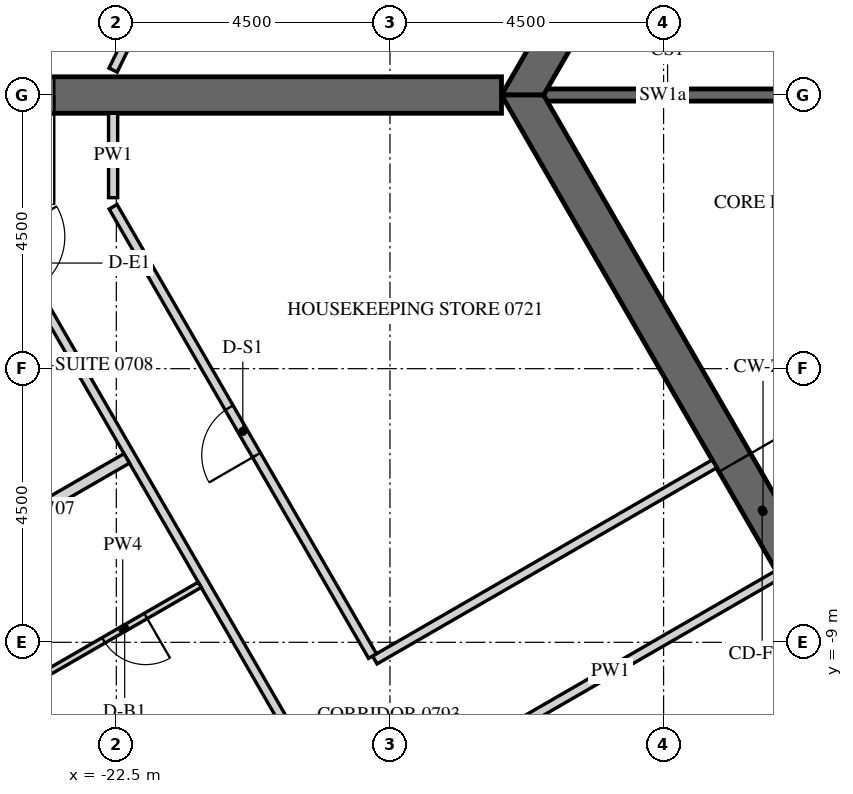
"""IFC4 building model, lengths in metres.
Left out: names, types, materials, properties, quantities, classifications, styles, units other than length and angle.
Written with IfcOpenShell. Run it as: python <this file> out.ifc"""

import sys

from ifc_helpers import new_model, si_unit, direction, frame, frame_2d, origin, place, context, subcontext, project, spatial, polyline, rectangle, outline, extrude, element, fill, save


model = new_model("IFC4")
c1 = context("Model", 3, precision=1e-05, world=origin(), true_north=direction((0.0, 1.0)))
c2 = subcontext(c1, "Body", "Model", "MODEL_VIEW")
j1 = project(units=[si_unit("LENGTHUNIT", "METRE"), si_unit("PLANEANGLEUNIT", "RADIAN")], contexts=[c1])
p1 = place(None, origin())
s1 = spatial("IfcSite", under=j1, at=p1, CompositionType="ELEMENT")
p2 = place(p1, origin())
s2 = spatial("IfcBuilding", under=s1, at=p2, CompositionType="ELEMENT")
p3 = place(p2, frame((0.0, 0.0, 99.9)))
s3 = spatial("IfcBuildingStorey", under=s2, at=p3, CompositionType="ELEMENT", Elevation=99.9)
p4 = place(p3, frame((-19.595, 27.633, -0.15), z_axis=(0.0, 0.0, 1.0), x_axis=(-0.438368285794, -0.898795441694, 0.0)))
e1 = element("IfcWall", 1, at=p4, inside=s3, PredefinedType="SOLIDWALL", context=c2, shape_type="SweptSolid", body=[
    extrude(outline(polyline([(-0.026, -0.275), (30.093, -0.275), (30.048, 0.275), (0.026, 0.275), (-0.026, -0.275)])), origin(), (0.0, 0.0, 1.0), 3.9),
])
p5 = place(p4, frame((1.236, 0.0, 1.05)))
e2 = element("IfcOpeningElement", 2, at=p5, cuts=e1, PredefinedType="OPENING", context=c2, shape_type="SweptSolid", body=[
    extrude(rectangle(XDim=2.4, YDim=2.4, at=frame_2d((1.2, 1.2))), frame((0.0, 0.285, 0.0), z_axis=(0.0, -1.0, 0.0), x_axis=(1.0, 0.0, 0.0)), (0.0, 0.0, 1.0), 0.57),
])
p6 = place(p4, frame((4.835, 0.0, 1.05)))
e3 = element("IfcOpeningElement", 3, at=p6, cuts=e1, PredefinedType="OPENING", context=c2, shape_type="SweptSolid", body=[
    extrude(rectangle(XDim=2.4, YDim=2.4, at=frame_2d((1.2, 1.2))), frame((0.0, 0.285, 0.0), z_axis=(0.0, -1.0, 0.0), x_axis=(1.0, 0.0, 0.0)), (0.0, 0.0, 1.0), 0.57),
])
p7 = place(p4, frame((8.436, 0.0, 1.05)))
e4 = element("IfcOpeningElement", 4, at=p7, cuts=e1, PredefinedType="OPENING", context=c2, shape_type="SweptSolid", body=[
    extrude(rectangle(XDim=2.4, YDim=2.4, at=frame_2d((1.2, 1.2))), frame((0.0, 0.285, 0.0), z_axis=(0.0, -1.0, 0.0), x_axis=(1.0, 0.0, 0.0)), (0.0, 0.0, 1.0), 0.57),
])
p8 = place(p4, frame((12.035, 0.0, 1.05)))
e5 = element("IfcOpeningElement", 5, at=p8, cuts=e1, PredefinedType="OPENING", context=c2, shape_type="SweptSolid", body=[
    extrude(rectangle(XDim=2.4, YDim=2.4, at=frame_2d((1.2, 1.2))), frame((0.0, 0.285, 0.0), z_axis=(0.0, -1.0, 0.0), x_axis=(1.0, 0.0, 0.0)), (0.0, 0.0, 1.0), 0.57),
])
p9 = place(p4, frame((15.635, 0.0, 1.05)))
e6 = element("IfcOpeningElement", 6, at=p9, cuts=e1, PredefinedType="OPENING", context=c2, shape_type="SweptSolid", body=[
    extrude(rectangle(XDim=2.4, YDim=2.4, at=frame_2d((1.2, 1.2))), frame((0.0, 0.285, 0.0), z_axis=(0.0, -1.0, 0.0), x_axis=(1.0, 0.0, 0.0)), (0.0, 0.0, 1.0), 0.57),
])
p10 = place(p4, frame((19.236, 0.0, 1.05)))
e7 = element("IfcOpeningElement", 7, at=p10, cuts=e1, PredefinedType="OPENING", context=c2, shape_type="SweptSolid", body=[
    extrude(rectangle(XDim=2.4, YDim=2.4, at=frame_2d((1.2, 1.2))), frame((0.0, 0.285, 0.0), z_axis=(0.0, -1.0, 0.0), x_axis=(1.0, 0.0, 0.0)), (0.0, 0.0, 1.0), 0.57),
])
p11 = place(p4, frame((22.835, 0.0, 1.05)))
e8 = element("IfcOpeningElement", 8, at=p11, cuts=e1, PredefinedType="OPENING", context=c2, shape_type="SweptSolid", body=[
    extrude(rectangle(XDim=2.4, YDim=2.4, at=frame_2d((1.2, 1.2))), frame((0.0, 0.285, 0.0), z_axis=(0.0, -1.0, 0.0), x_axis=(1.0, 0.0, 0.0)), (0.0, 0.0, 1.0), 0.57),
])
p12 = place(p4, frame((26.436, 0.0, 1.05)))
e9 = element("IfcOpeningElement", 9, at=p12, cuts=e1, PredefinedType="OPENING", context=c2, shape_type="SweptSolid", body=[
    extrude(rectangle(XDim=2.4, YDim=2.4, at=frame_2d((1.2, 1.2))), frame((0.0, 0.285, 0.0), z_axis=(0.0, -1.0, 0.0), x_axis=(1.0, 0.0, 0.0)), (0.0, 0.0, 1.0), 0.57),
])
p13 = place(p3, frame((-32.655, -2.89, -0.15), z_axis=(0.0, 0.0, 1.0), x_axis=(0.499997711317, -0.866026725152, 0.0)))
e10 = element("IfcWall", 10, at=p13, inside=s3, PredefinedType="SOLIDWALL", context=c2, shape_type="SweptSolid", body=[
    extrude(outline(polyline([(-0.022, -0.275), (30.097, -0.275), (30.045, 0.275), (0.022, 0.275), (-0.022, -0.275)])), origin(), (0.0, 0.0, 1.0), 3.9),
])
p14 = place(p13, frame((1.236, 0.0, 1.05)))
e11 = element("IfcOpeningElement", 11, at=p14, cuts=e10, PredefinedType="OPENING", context=c2, shape_type="SweptSolid", body=[
    extrude(rectangle(XDim=2.4, YDim=2.4, at=frame_2d((1.2, 1.2))), frame((0.0, 0.285, 0.0), z_axis=(0.0, -1.0, 0.0), x_axis=(1.0, 0.0, 0.0)), (0.0, 0.0, 1.0), 0.57),
])
p15 = place(p13, frame((4.835, 0.0, 1.05)))
e12 = element("IfcOpeningElement", 12, at=p15, cuts=e10, PredefinedType="OPENING", context=c2, shape_type="SweptSolid", body=[
    extrude(rectangle(XDim=2.4, YDim=2.4, at=frame_2d((1.2, 1.2))), frame((0.0, 0.285, 0.0), z_axis=(0.0, -1.0, 0.0), x_axis=(1.0, 0.0, 0.0)), (0.0, 0.0, 1.0), 0.57),
])
p16 = place(p13, frame((8.436, 0.0, 1.05)))
e13 = element("IfcOpeningElement", 13, at=p16, cuts=e10, PredefinedType="OPENING", context=c2, shape_type="SweptSolid", body=[
    extrude(rectangle(XDim=2.4, YDim=2.4, at=frame_2d((1.2, 1.2))), frame((0.0, 0.285, 0.0), z_axis=(0.0, -1.0, 0.0), x_axis=(1.0, 0.0, 0.0)), (0.0, 0.0, 1.0), 0.57),
])
p17 = place(p13, frame((12.035, 0.0, 1.05)))
e14 = element("IfcOpeningElement", 14, at=p17, cuts=e10, PredefinedType="OPENING", context=c2, shape_type="SweptSolid", body=[
    extrude(rectangle(XDim=2.4, YDim=2.4, at=frame_2d((1.2, 1.2))), frame((0.0, 0.285, 0.0), z_axis=(0.0, -1.0, 0.0), x_axis=(1.0, 0.0, 0.0)), (0.0, 0.0, 1.0), 0.57),
])
p18 = place(p13, frame((15.635, 0.0, 1.05)))
e15 = element("IfcOpeningElement", 15, at=p18, cuts=e10, PredefinedType="OPENING", context=c2, shape_type="SweptSolid", body=[
    extrude(rectangle(XDim=2.4, YDim=2.4, at=frame_2d((1.2, 1.2))), frame((0.0, 0.285, 0.0), z_axis=(0.0, -1.0, 0.0), x_axis=(1.0, 0.0, 0.0)), (0.0, 0.0, 1.0), 0.57),
])
p19 = place(p13, frame((19.236, 0.0, 1.05)))
e16 = element("IfcOpeningElement", 16, at=p19, cuts=e10, PredefinedType="OPENING", context=c2, shape_type="SweptSolid", body=[
    extrude(rectangle(XDim=2.4, YDim=2.4, at=frame_2d((1.2, 1.2))), frame((0.0, 0.285, 0.0), z_axis=(0.0, -1.0, 0.0), x_axis=(1.0, 0.0, 0.0)), (0.0, 0.0, 1.0), 0.57),
])
p20 = place(p13, frame((22.835, 0.0, 1.05)))
e17 = element("IfcOpeningElement", 17, at=p20, cuts=e10, PredefinedType="OPENING", context=c2, shape_type="SweptSolid", body=[
    extrude(rectangle(XDim=2.4, YDim=2.4, at=frame_2d((1.2, 1.2))), frame((0.0, 0.285, 0.0), z_axis=(0.0, -1.0, 0.0), x_axis=(1.0, 0.0, 0.0)), (0.0, 0.0, 1.0), 0.57),
])
p21 = place(p13, frame((26.436, 0.0, 1.05)))
e18 = element("IfcOpeningElement", 18, at=p21, cuts=e10, PredefinedType="OPENING", context=c2, shape_type="SweptSolid", body=[
    extrude(rectangle(XDim=2.4, YDim=2.4, at=frame_2d((1.2, 1.2))), frame((0.0, 0.285, 0.0), z_axis=(0.0, -1.0, 0.0), x_axis=(1.0, 0.0, 0.0)), (0.0, 0.0, 1.0), 0.57),
])
p22 = place(p3, frame((-7.91, 13.7, -0.15), z_axis=(0.0, 0.0, 1.0), x_axis=(-0.499999880136, -0.866025472988, 0.0)))
e19 = element("IfcWall", 19, at=p22, inside=s3, PredefinedType="SHEAR", context=c2, shape_type="SweptSolid", body=[
    extrude(outline(polyline([(-0.173, -0.3), (15.993, -0.3), (15.646, 0.3), (0.173, 0.3), (-0.173, -0.3)])), origin(), (0.0, 0.0, 1.0), 3.9),
])
p23 = place(p22, frame((7.039, 0.0, 0.15)))
e20 = element("IfcOpeningElement", 20, at=p23, cuts=e19, PredefinedType="OPENING", context=c2, shape_type="SweptSolid", body=[
    extrude(rectangle(XDim=1.8, YDim=2.4, at=frame_2d((0.9, 1.2))), frame((0.0, 0.31, 0.0), z_axis=(0.0, -1.0, 0.0), x_axis=(1.0, 0.0, 0.0)), (0.0, 0.0, 1.0), 0.62),
])
p24 = place(p3, frame((-15.819, 0.0, -0.15), z_axis=(0.0, 0.0, 1.0), x_axis=(0.499999880136, -0.866025472988, 0.0)))
e21 = element("IfcWall", 21, at=p24, inside=s3, PredefinedType="SHEAR", context=c2, shape_type="SweptSolid", body=[
    extrude(outline(polyline([(-0.173, -0.3), (15.993, -0.3), (15.646, 0.3), (0.173, 0.3), (-0.173, -0.3)])), origin(), (0.0, 0.0, 1.0), 3.9),
])
p25 = place(p24, frame((6.981, 0.0, 0.15)))
e22 = element("IfcOpeningElement", 22, at=p25, cuts=e21, PredefinedType="OPENING", context=c2, shape_type="SweptSolid", body=[
    extrude(rectangle(XDim=1.8, YDim=2.4, at=frame_2d((0.9, 1.2))), frame((0.0, 0.31, 0.0), z_axis=(0.0, -1.0, 0.0), x_axis=(1.0, 0.0, 0.0)), (0.0, 0.0, 1.0), 0.62),
])
p26 = place(p3, frame((-16.166, 0.0, -0.15), z_axis=(0.0, 0.0, 1.0), x_axis=(-1.0, 0.0, 0.0)))
e23 = element("IfcWall", 23, at=p26, inside=s3, PredefinedType="SHEAR", context=c2, shape_type="SweptSolid", body=[
    extrude(rectangle(XDim=16.509, YDim=0.6, at=frame_2d((8.254, 0.0))), origin(), (0.0, 0.0, 1.0), 3.9),
])
p27 = place(p26, frame((7.354, 0.0, 0.15)))
e24 = element("IfcOpeningElement", 24, at=p27, cuts=e23, PredefinedType="OPENING", context=c2, shape_type="SweptSolid", body=[
    extrude(rectangle(XDim=1.8, YDim=2.4, at=frame_2d((0.9, 1.2))), frame((0.0, 0.31, 0.0), z_axis=(0.0, -1.0, 0.0), x_axis=(1.0, 0.0, 0.0)), (0.0, 0.0, 1.0), 0.62),
])
p28 = place(p3, frame((-11.547, 0.0, -0.15), z_axis=(0.0, 0.0, 1.0), x_axis=(-1.0, 0.0, 0.0)))
e25 = element("IfcWall", 25, at=p28, inside=s3, PredefinedType="SHEAR", context=c2, shape_type="SweptSolid", body=[
    extrude(rectangle(XDim=3.926, YDim=0.2, at=frame_2d((1.963, 0.0))), origin(), (0.0, 0.0, 1.0), 3.9),
])
p29 = place(p3, frame((-22.553, 0.41, 0.0), z_axis=(0.0, 0.0, 1.0), x_axis=(0.438382679221, 0.898788421465, 0.0)))
e26 = element("IfcWall", 26, at=p29, inside=s3, PredefinedType="PARTITIONING", context=c2, shape_type="SweptSolid", body=[
    extrude(rectangle(XDim=9.866, YDim=0.15, at=frame_2d((4.933, 0.0))), origin(), (0.0, 0.0, 1.0), 2.988),
])
p30 = place(p29, frame((4.483, 0.0, 0.0)))
e27 = element("IfcOpeningElement", 27, at=p30, cuts=e26, PredefinedType="OPENING", context=c2, shape_type="SweptSolid", body=[
    extrude(rectangle(XDim=0.9, YDim=2.1, at=frame_2d((0.45, 1.05))), frame((0.0, 0.085, 0.0), z_axis=(0.0, -1.0, 0.0), x_axis=(1.0, 0.0, 0.0)), (0.0, 0.0, 1.0), 0.17),
])
p31 = place(p3, frame((-24.436, -2.175, 0.0), z_axis=(0.0, 0.0, 1.0), x_axis=(0.499996816197, -0.866027241946, 0.0)))
e28 = element("IfcWall", 28, at=p31, inside=s3, PredefinedType="PARTITIONING", context=c2, shape_type="SweptSolid", body=[
    extrude(rectangle(XDim=24.238, YDim=0.15, at=frame_2d((12.119, 0.0))), origin(), (0.0, 0.0, 1.0), 2.988),
])
p32 = place(p31, frame((0.179, 0.0, 0.0)))
e29 = element("IfcOpeningElement", 29, at=p32, cuts=e28, PredefinedType="OPENING", context=c2, shape_type="SweptSolid", body=[
    extrude(rectangle(XDim=1.0, YDim=2.1, at=frame_2d((0.5, 1.05))), frame((0.0, 0.085, 0.0), z_axis=(0.0, -1.0, 0.0), x_axis=(1.0, 0.0, 0.0)), (0.0, 0.0, 1.0), 0.17),
])
p33 = place(p31, frame((12.246, 0.0, 0.0)))
e30 = element("IfcOpeningElement", 30, at=p33, cuts=e28, PredefinedType="OPENING", context=c2, shape_type="SweptSolid", body=[
    extrude(rectangle(XDim=1.0, YDim=2.1, at=frame_2d((0.5, 1.05))), frame((0.0, 0.085, 0.0), z_axis=(0.0, -1.0, 0.0), x_axis=(1.0, 0.0, 0.0)), (0.0, 0.0, 1.0), 0.17),
])
p34 = place(p31, frame((19.792, 0.0, 0.0)))
e31 = element("IfcOpeningElement", 31, at=p34, cuts=e28, PredefinedType="OPENING", context=c2, shape_type="SweptSolid", body=[
    extrude(rectangle(XDim=1.0, YDim=2.1, at=frame_2d((0.5, 1.05))), frame((0.0, 0.085, 0.0), z_axis=(0.0, -1.0, 0.0), x_axis=(1.0, 0.0, 0.0)), (0.0, 0.0, 1.0), 0.17),
])
p35 = place(p3, frame((-12.664, -6.066, 0.0), z_axis=(0.0, 0.0, 1.0), x_axis=(-0.866021702275, -0.500006411147, 0.0)))
e32 = element("IfcWall", 32, at=p35, inside=s3, PredefinedType="PARTITIONING", context=c2, shape_type="SweptSolid", body=[
    extrude(rectangle(XDim=6.45, YDim=0.15, at=frame_2d((3.225, 0.0))), origin(), (0.0, 0.0, 1.0), 2.988),
])
p36 = place(p3, frame((-18.287, -9.226, 0.0), z_axis=(0.0, 0.0, 1.0), x_axis=(-0.500004853958, 0.866022601332, 0.0)))
e33 = element("IfcWall", 33, at=p36, inside=s3, PredefinedType="PARTITIONING", context=c2, shape_type="SweptSolid", body=[
    extrude(rectangle(XDim=8.531, YDim=0.15, at=frame_2d((4.266, 0.0))), origin(), (0.0, 0.0, 1.0), 2.988),
])
p37 = place(p36, frame((3.816, 0.0, 0.0)))
e34 = element("IfcOpeningElement", 34, at=p37, cuts=e33, PredefinedType="OPENING", context=c2, shape_type="SweptSolid", body=[
    extrude(rectangle(XDim=0.9, YDim=2.1, at=frame_2d((0.45, 1.05))), frame((0.0, 0.085, 0.0), z_axis=(0.0, -1.0, 0.0), x_axis=(1.0, 0.0, 0.0)), (0.0, 0.0, 1.0), 0.17),
])
p38 = place(p3, frame((-22.553, -1.688, 0.0), z_axis=(0.0, 0.0, 1.0), x_axis=(0.0, 1.0, 0.0)))
e35 = element("IfcWall", 35, at=p38, inside=s3, PredefinedType="PARTITIONING", context=c2, shape_type="SweptSolid", body=[
    extrude(rectangle(XDim=1.387, YDim=0.15, at=frame_2d((0.694, 0.0))), origin(), (0.0, 0.0, 1.0), 2.988),
])
p39 = place(p3, frame((-17.135, -11.072, 0.0), z_axis=(0.0, 0.0, 1.0), x_axis=(0.866028703517, 0.499994284652, 0.0)))
e36 = element("IfcWall", 36, at=p39, inside=s3, PredefinedType="PARTITIONING", context=c2, shape_type="SweptSolid", body=[
    extrude(rectangle(XDim=6.375, YDim=0.15, at=frame_2d((3.188, 0.0))), origin(), (0.0, 0.0, 1.0), 2.988),
])
p40 = place(p3, frame((-28.499, -9.538, 0.0), z_axis=(0.0, 0.0, 1.0), x_axis=(0.866024672353, 0.500001266874, 0.0)))
e37 = element("IfcWall", 37, at=p40, inside=s3, PredefinedType="PARTITIONING", context=c2, shape_type="SweptSolid", body=[
    extrude(rectangle(XDim=7.125, YDim=0.18, at=frame_2d((3.562, 0.0))), origin(), (0.0, 0.0, 1.0), 2.988),
])
p41 = place(p3, frame((-21.128, -8.054, 0.0), z_axis=(0.0, 0.0, 1.0), x_axis=(-0.866046596414, -0.499963291492, 0.0)))
e38 = element("IfcWall", 38, at=p41, inside=s3, PredefinedType="PARTITIONING", context=c2, shape_type="SweptSolid", body=[
    extrude(rectangle(XDim=2.925, YDim=0.1, at=frame_2d((1.462, 0.0))), origin(), (0.0, 0.0, 1.0), 2.988),
])
p42 = place(p41, frame((1.025, 0.0, 0.0)))
e39 = element("IfcOpeningElement", 39, at=p42, cuts=e38, PredefinedType="OPENING", context=c2, shape_type="SweptSolid", body=[
    extrude(rectangle(XDim=0.8, YDim=2.1, at=frame_2d((0.4, 1.05))), frame((0.0, 0.06, 0.0), z_axis=(0.0, -1.0, 0.0), x_axis=(1.0, 0.0, 0.0)), (0.0, 0.0, 1.0), 0.12),
])
p43 = place(p25, origin())
e40 = element("IfcDoor", 40, at=p43, inside=s3, OperationType="DOUBLE_DOOR_SINGLE_SWING", PredefinedType="DOOR", context=c2, shape_type="SweptSolid", body=[
    extrude(rectangle(XDim=1.8, YDim=2.4, at=frame_2d((0.9, 1.2))), frame((0.0, 0.025, 0.0), z_axis=(0.0, -1.0, 0.0), x_axis=(1.0, 0.0, 0.0)), (0.0, 0.0, 1.0), 0.05),
])
fill(e22, e40)
p44 = place(p27, origin())
e41 = element("IfcDoor", 41, at=p44, inside=s3, OperationType="DOUBLE_DOOR_SINGLE_SWING", PredefinedType="DOOR", context=c2, shape_type="SweptSolid", body=[
    extrude(rectangle(XDim=1.8, YDim=2.4, at=frame_2d((0.9, 1.2))), frame((0.0, 0.025, 0.0), z_axis=(0.0, -1.0, 0.0), x_axis=(1.0, 0.0, 0.0)), (0.0, 0.0, 1.0), 0.05),
])
fill(e24, e41)
p45 = place(p42, origin())
e42 = element("IfcDoor", 42, at=p45, inside=s3, OperationType="SINGLE_SWING_RIGHT", PredefinedType="DOOR", context=c2, shape_type="SweptSolid", body=[
    extrude(rectangle(XDim=0.8, YDim=2.1, at=frame_2d((0.4, 1.05))), frame((0.0, 0.025, 0.0), z_axis=(0.0, -1.0, 0.0), x_axis=(1.0, 0.0, 0.0)), (0.0, 0.0, 1.0), 0.05),
])
fill(e39, e42)
p46 = place(p37, origin())
e43 = element("IfcDoor", 43, at=p46, inside=s3, OperationType="SINGLE_SWING_RIGHT", PredefinedType="DOOR", context=c2, shape_type="SweptSolid", body=[
    extrude(rectangle(XDim=0.9, YDim=2.1, at=frame_2d((0.45, 1.05))), frame((0.0, 0.025, 0.0), z_axis=(0.0, -1.0, 0.0), x_axis=(1.0, 0.0, 0.0)), (0.0, 0.0, 1.0), 0.05),
])
fill(e34, e43)
save(model, sys.argv[1])
